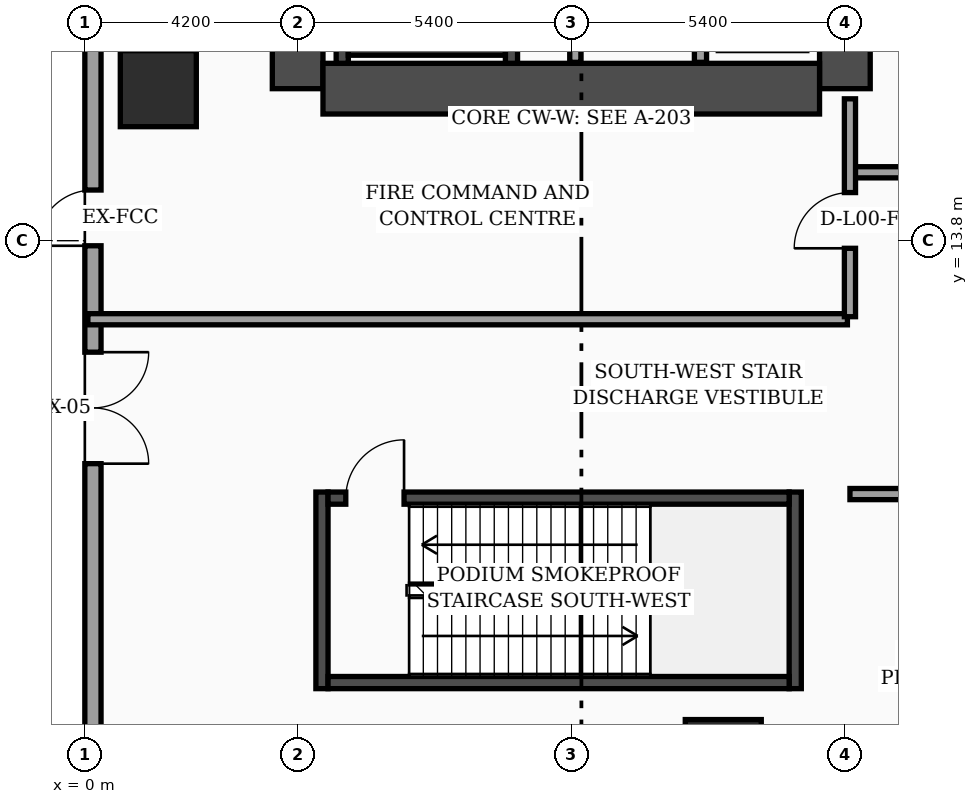
"""IFC4 building model, lengths in metres.
Left out: names, types, materials, properties, quantities, classifications, styles, units other than length and angle.
Written with IfcOpenShell. Run it as: python <this file> out.ifc"""

import sys

from ifc_helpers import new_model, si_unit, direction, frame, frame_2d, origin, origin_2d, place, context, subcontext, project, spatial, rectangle, extrude, element, fill, save


model = new_model("IFC4")
c1 = context("Model", 3, precision=1e-05, world=origin(), true_north=direction((0.0, 1.0)))
c2 = subcontext(c1, "Body", "Model", "MODEL_VIEW")
j1 = project(units=[si_unit("LENGTHUNIT", "METRE"), si_unit("PLANEANGLEUNIT", "RADIAN")], contexts=[c1])
p1 = place(None, origin())
s1 = spatial("IfcSite", under=j1, at=p1, CompositionType="ELEMENT")
p2 = place(p1, origin())
s2 = spatial("IfcBuilding", under=s1, at=p2, CompositionType="ELEMENT")
p3 = place(p2, origin())
s3 = spatial("IfcBuildingStorey", under=s2, at=p3, CompositionType="ELEMENT", Elevation=0.0)
p4 = place(p3, frame((4.2, 16.8, 0.0), z_axis=(0.0, 0.0, 1.0), x_axis=(0.0, 1.0, 0.0)))
e1 = element("IfcWall", 1, at=p4, inside=s3, PredefinedType="SHEAR", context=c2, shape_type="SweptSolid", body=[
    extrude(rectangle(XDim=21.6, YDim=1.0, at=frame_2d((10.8, 0.0))), origin(), (0.0, 0.0, 1.0), 5.68),
])
p5 = place(p3, frame((15.0, 16.8, 0.0), z_axis=(0.0, 0.0, 1.0), x_axis=(0.0, 1.0, 0.0)))
e2 = element("IfcWall", 2, at=p5, inside=s3, PredefinedType="SHEAR", context=c2, shape_type="SweptSolid", body=[
    extrude(rectangle(XDim=21.6, YDim=1.0, at=frame_2d((10.8, 0.0))), origin(), (0.0, 0.0, 1.0), 5.68),
])
p6 = place(p5, frame((8.65, 0.0, 0.0)))
e3 = element("IfcOpeningElement", 3, at=p6, cuts=e2, PredefinedType="OPENING", context=c2, shape_type="SweptSolid", body=[
    extrude(rectangle(XDim=1.1, YDim=2.2, at=frame_2d((0.55, 1.1))), frame((0.0, 0.51, 0.0), z_axis=(0.0, -1.0, 0.0), x_axis=(1.0, 0.0, 0.0)), (0.0, 0.0, 1.0), 1.02),
])
p7 = place(p5, frame((1.25, 0.0, 0.0)))
e4 = element("IfcOpeningElement", 4, at=p7, cuts=e2, PredefinedType="OPENING", context=c2, shape_type="SweptSolid", body=[
    extrude(rectangle(XDim=1.1, YDim=2.2, at=frame_2d((0.55, 1.1))), frame((0.0, 0.51, 0.0), z_axis=(0.0, -1.0, 0.0), x_axis=(1.0, 0.0, 0.0)), (0.0, 0.0, 1.0), 1.02),
])
p8 = place(p5, frame((3.8, 0.0, 0.0)))
e5 = element("IfcOpeningElement", 5, at=p8, cuts=e2, PredefinedType="OPENING", context=c2, shape_type="SweptSolid", body=[
    extrude(rectangle(XDim=1.1, YDim=2.2, at=frame_2d((0.55, 1.1))), frame((0.0, 0.51, 0.0), z_axis=(0.0, -1.0, 0.0), x_axis=(1.0, 0.0, 0.0)), (0.0, 0.0, 1.0), 1.02),
])
p9 = place(p5, frame((6.35, 0.0, 0.0)))
e6 = element("IfcOpeningElement", 6, at=p9, cuts=e2, PredefinedType="OPENING", context=c2, shape_type="SweptSolid", body=[
    extrude(rectangle(XDim=1.1, YDim=2.2, at=frame_2d((0.55, 1.1))), frame((0.0, 0.51, 0.0), z_axis=(0.0, -1.0, 0.0), x_axis=(1.0, 0.0, 0.0)), (0.0, 0.0, 1.0), 1.02),
])
p10 = place(p5, frame((10.85, 0.0, 0.0)))
e7 = element("IfcOpeningElement", 7, at=p10, cuts=e2, PredefinedType="OPENING", context=c2, shape_type="SweptSolid", body=[
    extrude(rectangle(XDim=1.1, YDim=2.2, at=frame_2d((0.55, 1.1))), frame((0.0, 0.51, 0.0), z_axis=(0.0, -1.0, 0.0), x_axis=(1.0, 0.0, 0.0)), (0.0, 0.0, 1.0), 1.02),
])
p11 = place(p5, frame((13.5, 0.0, 0.0)))
e8 = element("IfcOpeningElement", 8, at=p11, cuts=e2, PredefinedType="OPENING", context=c2, shape_type="SweptSolid", body=[
    extrude(rectangle(XDim=1.1, YDim=2.2, at=frame_2d((0.55, 1.1))), frame((0.0, 0.51, 0.0), z_axis=(0.0, -1.0, 0.0), x_axis=(1.0, 0.0, 0.0)), (0.0, 0.0, 1.0), 1.02),
])
p12 = place(p5, frame((16.15, 0.0, 0.0)))
e9 = element("IfcOpeningElement", 9, at=p12, cuts=e2, PredefinedType="OPENING", context=c2, shape_type="SweptSolid", body=[
    extrude(rectangle(XDim=1.1, YDim=2.2, at=frame_2d((0.55, 1.1))), frame((0.0, 0.51, 0.0), z_axis=(0.0, -1.0, 0.0), x_axis=(1.0, 0.0, 0.0)), (0.0, 0.0, 1.0), 1.02),
])
p13 = place(p5, frame((18.9, 0.0, 0.0)))
e10 = element("IfcOpeningElement", 10, at=p13, cuts=e2, PredefinedType="OPENING", context=c2, shape_type="SweptSolid", body=[
    extrude(rectangle(XDim=1.1, YDim=2.2, at=frame_2d((0.55, 1.1))), frame((0.0, 0.51, 0.0), z_axis=(0.0, -1.0, 0.0), x_axis=(1.0, 0.0, 0.0)), (0.0, 0.0, 1.0), 1.02),
])
p14 = place(p3, frame((4.7, 16.8, 0.0), z_axis=(0.0, 0.0, 1.0), x_axis=(1.0, 0.0, 0.0)))
e11 = element("IfcWall", 11, at=p14, inside=s3, PredefinedType="SHEAR", context=c2, shape_type="SweptSolid", body=[
    extrude(rectangle(XDim=9.8, YDim=1.0, at=frame_2d((4.9, 0.0))), origin(), (0.0, 0.0, 1.0), 5.68),
])
p15 = place(p3, frame((5.08, 17.3, 0.0), z_axis=(0.0, 0.0, 1.0), x_axis=(0.0, 1.0, 0.0)))
e12 = element("IfcWall", 12, at=p15, inside=s3, PredefinedType="SOLIDWALL", context=c2, shape_type="SweptSolid", body=[
    extrude(rectangle(XDim=9.49, YDim=0.24, at=frame_2d((4.745, 0.0))), origin(), (0.0, 0.0, 1.0), 5.68),
])
p16 = place(p3, frame((8.42, 17.3, 0.0), z_axis=(0.0, 0.0, 1.0), x_axis=(0.0, 1.0, 0.0)))
e13 = element("IfcWall", 13, at=p16, inside=s3, PredefinedType="SOLIDWALL", context=c2, shape_type="SweptSolid", body=[
    extrude(rectangle(XDim=9.49, YDim=0.24, at=frame_2d((4.745, 0.0))), origin(), (0.0, 0.0, 1.0), 5.68),
])
p17 = place(p16, frame((0.35, 0.0, 0.0)))
e14 = element("IfcOpeningElement", 14, at=p17, cuts=e13, PredefinedType="OPENING", context=c2, shape_type="SweptSolid", body=[
    extrude(rectangle(XDim=1.15, YDim=2.2, at=frame_2d((0.575, 1.1))), frame((0.0, 0.13, 0.0), z_axis=(0.0, -1.0, 0.0), x_axis=(1.0, 0.0, 0.0)), (0.0, 0.0, 1.0), 0.26),
])
p18 = place(p3, frame((5.2, 17.58, 0.0), z_axis=(0.0, 0.0, 1.0), x_axis=(1.0, 0.0, 0.0)))
e15 = element("IfcWall", 15, at=p18, inside=s3, PredefinedType="SOLIDWALL", context=c2, shape_type="SweptSolid", body=[
    extrude(rectangle(XDim=3.1, YDim=0.24, at=frame_2d((1.55, 0.0))), origin(), (0.0, 0.0, 1.0), 5.68),
])
for number, where, z_axis, x_axis in (
    (16, (4.68, 4.96, 0.0), (0.0, 0.0, 1.0), (0.0, 1.0, 0.0)),
    (17, (14.02, 4.96, 0.0), (0.0, 0.0, 1.0), (0.0, 1.0, 0.0)),
):
    element("IfcWall", number, at=place(p3, frame(where, z_axis=z_axis, x_axis=x_axis)), inside=s3, PredefinedType="SOLIDWALL", context=c2, shape_type="SweptSolid", body=[
        extrude(rectangle(XDim=3.88, YDim=0.24, at=frame_2d((1.94, 0.0))), origin(), (0.0, 0.0, 1.0), 5.68),
    ])
p19 = place(p3, frame((4.8, 5.08, 0.0), z_axis=(0.0, 0.0, 1.0), x_axis=(1.0, 0.0, 0.0)))
e18 = element("IfcWall", 18, at=p19, inside=s3, PredefinedType="SOLIDWALL", context=c2, shape_type="SweptSolid", body=[
    extrude(rectangle(XDim=9.1, YDim=0.24, at=frame_2d((4.55, 0.0))), origin(), (0.0, 0.0, 1.0), 5.68),
])
p20 = place(p3, frame((4.8, 8.72, 0.0), z_axis=(0.0, 0.0, 1.0), x_axis=(1.0, 0.0, 0.0)))
e19 = element("IfcWall", 19, at=p20, inside=s3, PredefinedType="SOLIDWALL", context=c2, shape_type="SweptSolid", body=[
    extrude(rectangle(XDim=9.1, YDim=0.24, at=frame_2d((4.55, 0.0))), origin(), (0.0, 0.0, 1.0), 5.68),
])
p21 = place(p20, frame((0.35, 0.0, 0.0)))
e20 = element("IfcOpeningElement", 20, at=p21, cuts=e19, PredefinedType="OPENING", context=c2, shape_type="SweptSolid", body=[
    extrude(rectangle(XDim=1.15, YDim=2.2, at=frame_2d((0.575, 1.1))), frame((0.0, 0.13, 0.0), z_axis=(0.0, -1.0, 0.0), x_axis=(1.0, 0.0, 0.0)), (0.0, 0.0, 1.0), 0.26),
])
for number, where, z_axis, x_axis in (
    (21, (1.45, 16.8, 0.0), (0.0, 0.0, 1.0), (1.0, 0.0, 0.0)),
    (22, (12.6, 3.6, 0.0), (0.0, 0.0, 1.0), (1.0, 0.0, 0.0)),
):
    element("IfcColumn", number, at=place(p3, frame(where, z_axis=z_axis, x_axis=x_axis)), inside=s3, PredefinedType="COLUMN", context=c2, shape_type="SweptSolid", body=[
        extrude(rectangle(XDim=1.5, YDim=1.5, at=origin_2d()), origin(), (0.0, 0.0, 1.0), 5.68),
    ])
p22 = place(p3, frame((0.16, 2.3, 0.0), z_axis=(0.0, 0.0, 1.0), x_axis=(0.0, 1.0, 0.0)))
e23 = element("IfcWall", 23, at=p22, inside=s3, PredefinedType="SOLIDWALL", context=c2, shape_type="SweptSolid", body=[
    extrude(rectangle(XDim=53.4, YDim=0.32, at=frame_2d((26.7, 0.0))), origin(), (0.0, 0.0, 1.0), 5.68),
])
p23 = place(p22, frame((7.1, 0.0, 0.0)))
e24 = element("IfcOpeningElement", 24, at=p23, cuts=e23, PredefinedType="OPENING", context=c2, shape_type="SweptSolid", body=[
    extrude(rectangle(XDim=2.2, YDim=2.5, at=frame_2d((1.1, 1.25))), frame((0.0, 0.17, 0.0), z_axis=(0.0, -1.0, 0.0), x_axis=(1.0, 0.0, 0.0)), (0.0, 0.0, 1.0), 0.34),
])
p24 = place(p22, frame((11.4, 0.0, 0.0)))
e25 = element("IfcOpeningElement", 25, at=p24, cuts=e23, PredefinedType="OPENING", context=c2, shape_type="SweptSolid", body=[
    extrude(rectangle(XDim=1.1, YDim=2.2, at=frame_2d((0.55, 1.1))), frame((0.0, 0.17, 0.0), z_axis=(0.0, -1.0, 0.0), x_axis=(1.0, 0.0, 0.0)), (0.0, 0.0, 1.0), 0.34),
])
p25 = place(p3, frame((9.68, 17.32, 0.0), z_axis=(0.0, 0.0, 1.0), x_axis=(0.0, 1.0, 0.0)))
e26 = element("IfcWall", 26, at=p25, inside=s3, PredefinedType="SOLIDWALL", context=c2, shape_type="SweptSolid", body=[
    extrude(rectangle(XDim=12.44, YDim=0.22, at=frame_2d((6.22, 0.0))), origin(), (0.0, 0.0, 1.0), 5.68),
])
p26 = place(p25, frame((8.23, 0.0, 0.0)))
e27 = element("IfcOpeningElement", 27, at=p26, cuts=e26, PredefinedType="OPENING", context=c2, shape_type="SweptSolid", body=[
    extrude(rectangle(XDim=1.1, YDim=2.2, at=frame_2d((0.55, 1.1))), frame((0.0, 0.12, 0.0), z_axis=(0.0, -1.0, 0.0), x_axis=(1.0, 0.0, 0.0)), (0.0, 0.0, 1.0), 0.24),
])
p27 = place(p3, frame((12.15, 17.32, 0.0), z_axis=(0.0, 0.0, 1.0), x_axis=(0.0, 1.0, 0.0)))
e28 = element("IfcWall", 28, at=p27, inside=s3, PredefinedType="SOLIDWALL", context=c2, shape_type="SweptSolid", body=[
    extrude(rectangle(XDim=7.65, YDim=0.24, at=frame_2d((3.825, 0.0))), origin(), (0.0, 0.0, 1.0), 5.68),
])
p28 = place(p3, frame((0.06, 12.25, 0.0), z_axis=(0.0, 0.0, 1.0), x_axis=(1.0, 0.0, 0.0)))
e29 = element("IfcWall", 29, at=p28, inside=s3, PredefinedType="SOLIDWALL", context=c2, shape_type="SweptSolid", body=[
    extrude(rectangle(XDim=14.99, YDim=0.22, at=frame_2d((7.495, 0.0))), origin(), (0.0, 0.0, 1.0), 4.88),
])
p29 = place(p3, frame((15.1, 15.15, 0.0), z_axis=(0.0, 0.0, 1.0), x_axis=(1.0, 0.0, 0.0)))
e30 = element("IfcWall", 30, at=p29, inside=s3, PredefinedType="SOLIDWALL", context=c2, shape_type="SweptSolid", body=[
    extrude(rectangle(XDim=6.4, YDim=0.22, at=frame_2d((3.2, 0.0))), origin(), (0.0, 0.0, 1.0), 4.48),
])
p30 = place(p29, frame((1.8, 0.0, 0.0)))
e31 = element("IfcOpeningElement", 31, at=p30, cuts=e30, PredefinedType="OPENING", context=c2, shape_type="SweptSolid", body=[
    extrude(rectangle(XDim=2.2, YDim=2.5, at=frame_2d((1.1, 1.25))), frame((0.0, 0.12, 0.0), z_axis=(0.0, -1.0, 0.0), x_axis=(1.0, 0.0, 0.0)), (0.0, 0.0, 1.0), 0.24),
])
p31 = place(p3, frame((15.1, 8.8, 0.0), z_axis=(0.0, 0.0, 1.0), x_axis=(1.0, 0.0, 0.0)))
e32 = element("IfcWall", 32, at=p31, inside=s3, PredefinedType="SOLIDWALL", context=c2, shape_type="SweptSolid", body=[
    extrude(rectangle(XDim=6.4, YDim=0.22, at=frame_2d((3.2, 0.0))), origin(), (0.0, 0.0, 1.0), 5.68),
])
p32 = place(p31, frame((1.8, 0.0, 0.0)))
e33 = element("IfcOpeningElement", 33, at=p32, cuts=e32, PredefinedType="OPENING", context=c2, shape_type="SweptSolid", body=[
    extrude(rectangle(XDim=2.2, YDim=2.5, at=frame_2d((1.1, 1.25))), frame((0.0, 0.12, 0.0), z_axis=(0.0, -1.0, 0.0), x_axis=(1.0, 0.0, 0.0)), (0.0, 0.0, 1.0), 0.24),
])
p33 = place(p3, frame((15.1, 12.3, 0.0), z_axis=(0.0, 0.0, 1.0), x_axis=(0.0, 1.0, 0.0)))
e34 = element("IfcWall", 34, at=p33, inside=s3, PredefinedType="SOLIDWALL", context=c2, shape_type="SweptSolid", body=[
    extrude(rectangle(XDim=4.3, YDim=0.22, at=frame_2d((2.15, 0.0))), origin(), (0.0, 0.0, 1.0), 4.48),
])
p34 = place(p33, frame((1.35, 0.0, 0.0)))
e35 = element("IfcOpeningElement", 35, at=p34, cuts=e34, PredefinedType="OPENING", context=c2, shape_type="SweptSolid", body=[
    extrude(rectangle(XDim=1.1, YDim=2.2, at=frame_2d((0.55, 1.1))), frame((0.0, 0.12, 0.0), z_axis=(0.0, -1.0, 0.0), x_axis=(1.0, 0.0, 0.0)), (0.0, 0.0, 1.0), 0.24),
])
p35 = place(p23, origin())
e36 = element("IfcDoor", 36, at=p35, inside=s3, OperationType="DOUBLE_DOOR_SINGLE_SWING", PredefinedType="DOOR", context=c2, shape_type="SweptSolid", body=[
    extrude(rectangle(XDim=2.2, YDim=2.5, at=frame_2d((1.1, 1.25))), frame((0.0, 0.025, 0.0), z_axis=(0.0, -1.0, 0.0), x_axis=(1.0, 0.0, 0.0)), (0.0, 0.0, 1.0), 0.05),
])
fill(e24, e36)
p36 = place(p24, origin())
e37 = element("IfcDoor", 37, at=p36, inside=s3, OperationType="SINGLE_SWING_LEFT", PredefinedType="DOOR", context=c2, shape_type="SweptSolid", body=[
    extrude(rectangle(XDim=1.1, YDim=2.2, at=frame_2d((0.55, 1.1))), frame((0.0, 0.025, 0.0), z_axis=(0.0, -1.0, 0.0), x_axis=(1.0, 0.0, 0.0)), (0.0, 0.0, 1.0), 0.05),
])
fill(e25, e37)
p37 = place(p34, origin())
e38 = element("IfcDoor", 38, at=p37, inside=s3, OperationType="SINGLE_SWING_LEFT", PredefinedType="DOOR", context=c2, shape_type="SweptSolid", body=[
    extrude(rectangle(XDim=1.1, YDim=2.2, at=frame_2d((0.55, 1.1))), frame((0.0, 0.025, 0.0), z_axis=(0.0, -1.0, 0.0), x_axis=(1.0, 0.0, 0.0)), (0.0, 0.0, 1.0), 0.05),
])
fill(e35, e38)
p38 = place(p21, origin())
e39 = element("IfcDoor", 39, at=p38, inside=s3, OperationType="SINGLE_SWING_RIGHT", PredefinedType="DOOR", context=c2, shape_type="SweptSolid", body=[
    extrude(rectangle(XDim=1.15, YDim=2.2, at=frame_2d((0.575, 1.1))), frame((0.0, 0.025, 0.0), z_axis=(0.0, -1.0, 0.0), x_axis=(1.0, 0.0, 0.0)), (0.0, 0.0, 1.0), 0.05),
])
fill(e20, e39)
save(model, sys.argv[1])
